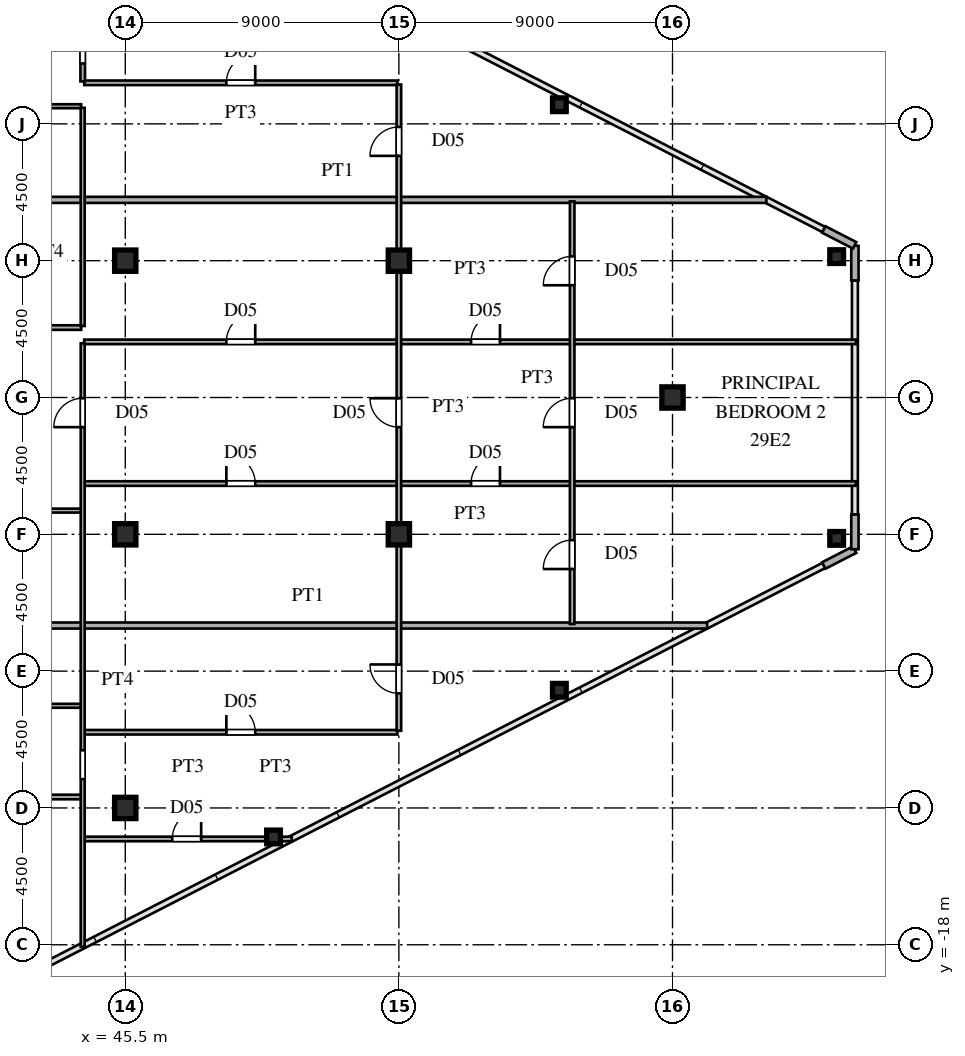
"""IFC4 building model, lengths in metres.
Left out: names, types, materials, properties, quantities, classifications, styles, units other than length and angle.
Written with IfcOpenShell. Run it as: python <this file> out.ifc"""

import sys

from ifc_helpers import new_model, si_unit, direction, frame, frame_2d, origin, origin_2d, place, context, subcontext, project, spatial, rectangle, hollow_rectangle, i_section, extrude, source, transform, mapped, element, fill, save


model = new_model("IFC4")
c1 = context("Model", 3, precision=1e-05, world=origin(), true_north=direction((0.0, 1.0)))
c2 = subcontext(c1, "Body", "Model", "MODEL_VIEW")
j1 = project(units=[si_unit("LENGTHUNIT", "METRE"), si_unit("PLANEANGLEUNIT", "RADIAN")], contexts=[c1])
p1 = place(None, origin())
s1 = spatial("IfcSite", under=j1, at=p1, CompositionType="ELEMENT")
p2 = place(p1, origin())
s2 = spatial("IfcBuilding", under=s1, at=p2, CompositionType="ELEMENT")
p3 = place(p2, frame((0.0, 0.0, 110.4)))
s3 = spatial("IfcBuildingStorey", under=s2, at=p3, CompositionType="ELEMENT", Elevation=110.4)
m1 = source(origin(), c2, "Body", "SweptSolid", [
    extrude(i_section(OverallWidth=0.7, OverallDepth=0.7, WebThickness=0.028, FlangeThickness=0.045, at=origin_2d()), origin(), (0.0, 0.0, 1.0), 3.6),
])
for number, where, z_axis, x_axis in (
    (1, (45.5, -13.5, 0.0), (0.0, 0.0, 1.0), (1.0, 0.0, 0.0)),
    (2, (45.5, -4.5, 0.0), (0.0, 0.0, 1.0), (1.0, 0.0, 0.0)),
    (3, (45.5, 4.5, 0.0), (0.0, 0.0, 1.0), (1.0, 0.0, 0.0)),
    (4, (54.5, -4.5, 0.0), (0.0, 0.0, 1.0), (1.0, 0.0, 0.0)),
    (5, (54.5, 4.5, 0.0), (0.0, 0.0, 1.0), (1.0, 0.0, 0.0)),
    (6, (63.5, 0.0, 0.0), (0.0, 0.0, 1.0), (1.0, 0.0, 0.0)),
):
    element("IfcColumn", number, at=place(p3, frame(where, z_axis=z_axis, x_axis=x_axis)), inside=s3, PredefinedType="COLUMN", context=c2, shape_type="MappedRepresentation", body=[
        mapped(m1, transform((0.0, 0.0, 0.0), scale=1.0)),
    ])
m2 = source(origin(), c2, "Body", "SweptSolid", [
    extrude(hollow_rectangle(XDim=0.45, YDim=0.45, WallThickness=0.018, at=origin_2d()), origin(), (0.0, 0.0, 1.0), 3.6),
])
for number, where, z_axis, x_axis in (
    (7, (68.9, -4.634, 0.0), (0.0, 0.0, 1.0), (1.0, 0.0, 0.0)),
    (8, (68.9, 4.634, 0.0), (0.0, 0.0, 1.0), (1.0, 0.0, 0.0)),
    (9, (50.377, -14.453, 0.0), (0.0, 0.0, 1.0), (1.0, 0.0, 0.0)),
    (10, (59.779, -9.629, 0.0), (0.0, 0.0, 1.0), (1.0, 0.0, 0.0)),
    (11, (59.779, 9.629, 0.0), (0.0, 0.0, 1.0), (1.0, 0.0, 0.0)),
):
    element("IfcColumn", number, at=place(p3, frame(where, z_axis=z_axis, x_axis=x_axis)), inside=s3, PredefinedType="COLUMN", context=c2, shape_type="MappedRepresentation", body=[
        mapped(m2, transform((0.0, 0.0, 0.0), scale=1.0)),
    ])
p4 = place(p3, frame((68.477, -5.525, 0.0), z_axis=(0.0, 0.0, 1.0), x_axis=(0.889797395748, 0.456355776255, 0.0)))
e12 = element("IfcWall", 12, at=p4, inside=s3, PredefinedType="SOLIDWALL", context=c2, shape_type="SweptSolid", body=[
    extrude(rectangle(XDim=1.14, YDim=0.24, at=frame_2d((0.57, 0.0))), origin(), (0.0, 0.0, 1.0), 3.38),
])
for number, where, z_axis, x_axis in (
    (13, (69.5, -4.99, 0.0), (0.0, 0.0, 1.0), (0.0, 1.0, 0.0)),
    (14, (69.5, 3.85, 0.0), (0.0, 0.0, 1.0), (0.0, 1.0, 0.0)),
):
    element("IfcWall", number, at=place(p3, frame(where, z_axis=z_axis, x_axis=x_axis)), inside=s3, PredefinedType="SOLIDWALL", context=c2, shape_type="SweptSolid", body=[
        extrude(rectangle(XDim=1.14, YDim=0.24, at=frame_2d((0.57, 0.0))), origin(), (0.0, 0.0, 1.0), 3.38),
    ])
p5 = place(p3, frame((69.491, 5.005, 0.0), z_axis=(0.0, 0.0, 1.0), x_axis=(-0.889797395748, 0.456355776255, 0.0)))
e15 = element("IfcWall", 15, at=p5, inside=s3, PredefinedType="SOLIDWALL", context=c2, shape_type="SweptSolid", body=[
    extrude(rectangle(XDim=1.14, YDim=0.24, at=frame_2d((0.57, 0.0))), origin(), (0.0, 0.0, 1.0), 3.38),
])
p6 = place(p3, frame((44.15, -14.52, 0.0), z_axis=(0.0, 0.0, 1.0), x_axis=(1.0, 0.0, 0.0)))
e16 = element("IfcWall", 16, at=p6, inside=s3, PredefinedType="PARTITIONING", context=c2, shape_type="SweptSolid", body=[
    extrude(rectangle(XDim=6.828, YDim=0.15, at=frame_2d((3.414, 0.0))), origin(), (0.0, 0.0, 1.0), 2.78),
])
p7 = place(p6, frame((2.896, 0.0, 0.0)))
e17 = element("IfcOpeningElement", 17, at=p7, cuts=e16, PredefinedType="OPENING", context=c2, shape_type="SweptSolid", body=[
    extrude(rectangle(XDim=0.95, YDim=2.15, at=frame_2d((0.475, 1.075))), frame((0.0, 0.085, 0.0), z_axis=(0.0, -1.0, 0.0), x_axis=(1.0, 0.0, 0.0)), (0.0, 0.0, 1.0), 0.17),
])
p8 = place(p3, frame((38.35, -13.14, 0.0), z_axis=(0.0, 0.0, 1.0), x_axis=(1.0, 0.0, 0.0)))
e18 = element("IfcWall", 18, at=p8, inside=s3, PredefinedType="PARTITIONING", context=c2, shape_type="SweptSolid", body=[
    extrude(rectangle(XDim=5.7, YDim=0.15, at=frame_2d((2.85, 0.0))), origin(), (0.0, 0.0, 1.0), 3.38),
])
p9 = place(p8, frame((2.375, 0.0, 0.0)))
e19 = element("IfcOpeningElement", 19, at=p9, cuts=e18, PredefinedType="OPENING", context=c2, shape_type="SweptSolid", body=[
    extrude(rectangle(XDim=0.95, YDim=2.15, at=frame_2d((0.475, 1.075))), frame((0.0, 0.085, 0.0), z_axis=(0.0, -1.0, 0.0), x_axis=(1.0, 0.0, 0.0)), (0.0, 0.0, 1.0), 0.17),
])
p10 = place(p3, frame((44.15, -11.01, 0.0), z_axis=(0.0, 0.0, 1.0), x_axis=(1.0, 0.0, 0.0)))
e20 = element("IfcWall", 20, at=p10, inside=s3, PredefinedType="PARTITIONING", context=c2, shape_type="SweptSolid", body=[
    extrude(rectangle(XDim=10.3, YDim=0.15, at=frame_2d((5.15, 0.0))), origin(), (0.0, 0.0, 1.0), 3.38),
])
p11 = place(p10, frame((4.675, 0.0, 0.0)))
e21 = element("IfcOpeningElement", 21, at=p11, cuts=e20, PredefinedType="OPENING", context=c2, shape_type="SweptSolid", body=[
    extrude(rectangle(XDim=0.95, YDim=2.15, at=frame_2d((0.475, 1.075))), frame((0.0, 0.085, 0.0), z_axis=(0.0, -1.0, 0.0), x_axis=(1.0, 0.0, 0.0)), (0.0, 0.0, 1.0), 0.17),
])
p12 = place(p3, frame((38.35, -10.14, 0.0), z_axis=(0.0, 0.0, 1.0), x_axis=(1.0, 0.0, 0.0)))
e22 = element("IfcWall", 22, at=p12, inside=s3, PredefinedType="PARTITIONING", context=c2, shape_type="SweptSolid", body=[
    extrude(rectangle(XDim=5.7, YDim=0.13, at=frame_2d((2.85, 0.0))), origin(), (0.0, 0.0, 1.0), 3.38),
])
p13 = place(p12, frame((2.41, 0.0, 0.0)))
e23 = element("IfcOpeningElement", 23, at=p13, cuts=e22, PredefinedType="OPENING", context=c2, shape_type="SweptSolid", body=[
    extrude(rectangle(XDim=0.88, YDim=2.1, at=frame_2d((0.44, 1.05))), frame((0.0, 0.075, 0.0), z_axis=(0.0, -1.0, 0.0), x_axis=(1.0, 0.0, 0.0)), (0.0, 0.0, 1.0), 0.15),
])
p14 = place(p3, frame((38.38, -7.5, 0.0), z_axis=(0.0, 0.0, 1.0), x_axis=(1.0, 0.0, 0.0)))
e24 = element("IfcWall", 24, at=p14, inside=s3, PredefinedType="PARTITIONING", context=c2, shape_type="SweptSolid", body=[
    extrude(rectangle(XDim=26.259, YDim=0.2, at=frame_2d((13.129, 0.0))), origin(), (0.0, 0.0, 1.0), 3.38),
])
p15 = place(p3, frame((38.35, -3.72, 0.0), z_axis=(0.0, 0.0, 1.0), x_axis=(1.0, 0.0, 0.0)))
e25 = element("IfcWall", 25, at=p15, inside=s3, PredefinedType="PARTITIONING", context=c2, shape_type="SweptSolid", body=[
    extrude(rectangle(XDim=5.7, YDim=0.13, at=frame_2d((2.85, 0.0))), origin(), (0.0, 0.0, 1.0), 3.38),
])
p16 = place(p15, frame((2.41, 0.0, 0.0)))
e26 = element("IfcOpeningElement", 26, at=p16, cuts=e25, PredefinedType="OPENING", context=c2, shape_type="SweptSolid", body=[
    extrude(rectangle(XDim=0.88, YDim=2.1, at=frame_2d((0.44, 1.05))), frame((0.0, 0.075, 0.0), z_axis=(0.0, -1.0, 0.0), x_axis=(1.0, 0.0, 0.0)), (0.0, 0.0, 1.0), 0.15),
])
p17 = place(p3, frame((44.15, -2.83, 0.0), z_axis=(0.0, 0.0, 1.0), x_axis=(1.0, 0.0, 0.0)))
e27 = element("IfcWall", 27, at=p17, inside=s3, PredefinedType="PARTITIONING", context=c2, shape_type="SweptSolid", body=[
    extrude(rectangle(XDim=25.385, YDim=0.15, at=frame_2d((12.692, 0.0))), origin(), (0.0, 0.0, 1.0), 3.38),
])
p18 = place(p17, frame((4.675, 0.0, 0.0)))
e28 = element("IfcOpeningElement", 28, at=p18, cuts=e27, PredefinedType="OPENING", context=c2, shape_type="SweptSolid", body=[
    extrude(rectangle(XDim=0.95, YDim=2.15, at=frame_2d((0.475, 1.075))), frame((0.0, 0.085, 0.0), z_axis=(0.0, -1.0, 0.0), x_axis=(1.0, 0.0, 0.0)), (0.0, 0.0, 1.0), 0.17),
])
p19 = place(p17, frame((12.725, 0.0, 0.0)))
e29 = element("IfcOpeningElement", 29, at=p19, cuts=e27, PredefinedType="OPENING", context=c2, shape_type="SweptSolid", body=[
    extrude(rectangle(XDim=0.95, YDim=2.15, at=frame_2d((0.475, 1.075))), frame((0.0, 0.085, 0.0), z_axis=(0.0, -1.0, 0.0), x_axis=(1.0, 0.0, 0.0)), (0.0, 0.0, 1.0), 0.17),
])
p20 = place(p3, frame((44.15, 1.83, 0.0), z_axis=(0.0, 0.0, 1.0), x_axis=(1.0, 0.0, 0.0)))
e30 = element("IfcWall", 30, at=p20, inside=s3, PredefinedType="PARTITIONING", context=c2, shape_type="SweptSolid", body=[
    extrude(rectangle(XDim=25.385, YDim=0.15, at=frame_2d((12.692, 0.0))), origin(), (0.0, 0.0, 1.0), 3.38),
])
p21 = place(p20, frame((4.675, 0.0, 0.0)))
e31 = element("IfcOpeningElement", 31, at=p21, cuts=e30, PredefinedType="OPENING", context=c2, shape_type="SweptSolid", body=[
    extrude(rectangle(XDim=0.95, YDim=2.15, at=frame_2d((0.475, 1.075))), frame((0.0, 0.085, 0.0), z_axis=(0.0, -1.0, 0.0), x_axis=(1.0, 0.0, 0.0)), (0.0, 0.0, 1.0), 0.17),
])
p22 = place(p20, frame((12.725, 0.0, 0.0)))
e32 = element("IfcOpeningElement", 32, at=p22, cuts=e30, PredefinedType="OPENING", context=c2, shape_type="SweptSolid", body=[
    extrude(rectangle(XDim=0.95, YDim=2.15, at=frame_2d((0.475, 1.075))), frame((0.0, 0.085, 0.0), z_axis=(0.0, -1.0, 0.0), x_axis=(1.0, 0.0, 0.0)), (0.0, 0.0, 1.0), 0.17),
])
p23 = place(p3, frame((38.35, 2.3, 0.0), z_axis=(0.0, 0.0, 1.0), x_axis=(1.0, 0.0, 0.0)))
e33 = element("IfcWall", 33, at=p23, inside=s3, PredefinedType="PARTITIONING", context=c2, shape_type="SweptSolid", body=[
    extrude(rectangle(XDim=5.7, YDim=0.15, at=frame_2d((2.85, 0.0))), origin(), (0.0, 0.0, 1.0), 3.38),
])
p24 = place(p23, frame((2.375, 0.0, 0.0)))
e34 = element("IfcOpeningElement", 34, at=p24, cuts=e33, PredefinedType="OPENING", context=c2, shape_type="SweptSolid", body=[
    extrude(rectangle(XDim=0.95, YDim=2.15, at=frame_2d((0.475, 1.075))), frame((0.0, 0.085, 0.0), z_axis=(0.0, -1.0, 0.0), x_axis=(1.0, 0.0, 0.0)), (0.0, 0.0, 1.0), 0.17),
])
p25 = place(p3, frame((38.38, 6.5, 0.0), z_axis=(0.0, 0.0, 1.0), x_axis=(1.0, 0.0, 0.0)))
e35 = element("IfcWall", 35, at=p25, inside=s3, PredefinedType="PARTITIONING", context=c2, shape_type="SweptSolid", body=[
    extrude(rectangle(XDim=28.208, YDim=0.2, at=frame_2d((14.104, 0.0))), origin(), (0.0, 0.0, 1.0), 3.38),
])
p26 = place(p3, frame((38.35, 9.58, 0.0), z_axis=(0.0, 0.0, 1.0), x_axis=(1.0, 0.0, 0.0)))
e36 = element("IfcWall", 36, at=p26, inside=s3, PredefinedType="PARTITIONING", context=c2, shape_type="SweptSolid", body=[
    extrude(rectangle(XDim=5.7, YDim=0.13, at=frame_2d((2.85, 0.0))), origin(), (0.0, 0.0, 1.0), 3.38),
])
p27 = place(p26, frame((2.41, 0.0, 0.0)))
e37 = element("IfcOpeningElement", 37, at=p27, cuts=e36, PredefinedType="OPENING", context=c2, shape_type="SweptSolid", body=[
    extrude(rectangle(XDim=0.88, YDim=2.1, at=frame_2d((0.44, 1.05))), frame((0.0, 0.075, 0.0), z_axis=(0.0, -1.0, 0.0), x_axis=(1.0, 0.0, 0.0)), (0.0, 0.0, 1.0), 0.15),
])
p28 = place(p3, frame((44.15, 10.35, 0.0), z_axis=(0.0, 0.0, 1.0), x_axis=(1.0, 0.0, 0.0)))
e38 = element("IfcWall", 38, at=p28, inside=s3, PredefinedType="PARTITIONING", context=c2, shape_type="SweptSolid", body=[
    extrude(rectangle(XDim=10.3, YDim=0.15, at=frame_2d((5.15, 0.0))), origin(), (0.0, 0.0, 1.0), 3.38),
])
p29 = place(p28, frame((4.675, 0.0, 0.0)))
e39 = element("IfcOpeningElement", 39, at=p29, cuts=e38, PredefinedType="OPENING", context=c2, shape_type="SweptSolid", body=[
    extrude(rectangle(XDim=0.95, YDim=2.15, at=frame_2d((0.475, 1.075))), frame((0.0, 0.085, 0.0), z_axis=(0.0, -1.0, 0.0), x_axis=(1.0, 0.0, 0.0)), (0.0, 0.0, 1.0), 0.17),
])
p30 = place(p3, frame((44.1, -18.069, 0.0), z_axis=(0.0, 0.0, 1.0), x_axis=(0.0, 1.0, 0.0)))
e40 = element("IfcWall", 40, at=p30, inside=s3, PredefinedType="PARTITIONING", context=c2, shape_type="SweptSolid", body=[
    extrude(rectangle(XDim=19.852, YDim=0.13, at=frame_2d((9.926, 0.0))), origin(), (0.0, 0.0, 1.0), 3.38),
])
p31 = place(p30, frame((5.516, 0.0, 0.0)))
e41 = element("IfcOpeningElement", 41, at=p31, cuts=e40, PredefinedType="OPENING", context=c2, shape_type="SweptSolid", body=[
    extrude(rectangle(XDim=0.95, YDim=2.15, at=frame_2d((0.475, 1.075))), frame((0.0, 0.075, 0.0), z_axis=(0.0, -1.0, 0.0), x_axis=(1.0, 0.0, 0.0)), (0.0, 0.0, 1.0), 0.15),
])
p32 = place(p30, frame((17.094, 0.0, 0.0)))
e42 = element("IfcOpeningElement", 42, at=p32, cuts=e40, PredefinedType="OPENING", context=c2, shape_type="SweptSolid", body=[
    extrude(rectangle(XDim=0.95, YDim=2.15, at=frame_2d((0.475, 1.075))), frame((0.0, 0.075, 0.0), z_axis=(0.0, -1.0, 0.0), x_axis=(1.0, 0.0, 0.0)), (0.0, 0.0, 1.0), 0.15),
])
p33 = place(p3, frame((44.1, 2.352, 0.0), z_axis=(0.0, 0.0, 1.0), x_axis=(0.0, 1.0, 0.0)))
e43 = element("IfcWall", 43, at=p33, inside=s3, PredefinedType="PARTITIONING", context=c2, shape_type="SweptSolid", body=[
    extrude(rectangle(XDim=7.176, YDim=0.13, at=frame_2d((3.588, 0.0))), origin(), (0.0, 0.0, 1.0), 3.38),
])
p34 = place(p3, frame((44.1, 10.395, 0.0), z_axis=(0.0, 0.0, 1.0), x_axis=(0.0, 1.0, 0.0)))
e44 = element("IfcWall", 44, at=p34, inside=s3, PredefinedType="PARTITIONING", context=c2, shape_type="SweptSolid", body=[
    extrude(rectangle(XDim=7.674, YDim=0.15, at=frame_2d((3.837, 0.0))), origin(), (0.0, 0.0, 1.0), 3.38),
])
p35 = place(p34, frame((0.591, 0.0, 0.0)))
e45 = element("IfcOpeningElement", 45, at=p35, cuts=e44, PredefinedType="OPENING", context=c2, shape_type="SweptSolid", body=[
    extrude(rectangle(XDim=0.95, YDim=2.15, at=frame_2d((0.475, 1.075))), frame((0.0, 0.085, 0.0), z_axis=(0.0, -1.0, 0.0), x_axis=(1.0, 0.0, 0.0)), (0.0, 0.0, 1.0), 0.17),
])
p36 = place(p3, frame((54.5, -10.961, 0.0), z_axis=(0.0, 0.0, 1.0), x_axis=(0.0, 1.0, 0.0)))
e46 = element("IfcWall", 46, at=p36, inside=s3, PredefinedType="PARTITIONING", context=c2, shape_type="SweptSolid", body=[
    extrude(rectangle(XDim=21.256, YDim=0.15, at=frame_2d((10.628, 0.0))), origin(), (0.0, 0.0, 1.0), 2.78),
])
p37 = place(p36, frame((1.23, 0.0, 0.0)))
e47 = element("IfcOpeningElement", 47, at=p37, cuts=e46, PredefinedType="OPENING", context=c2, shape_type="SweptSolid", body=[
    extrude(rectangle(XDim=0.95, YDim=2.15, at=frame_2d((0.475, 1.075))), frame((0.0, 0.085, 0.0), z_axis=(0.0, -1.0, 0.0), x_axis=(1.0, 0.0, 0.0)), (0.0, 0.0, 1.0), 0.17),
])
p38 = place(p36, frame((9.986, 0.0, 0.0)))
e48 = element("IfcOpeningElement", 48, at=p38, cuts=e46, PredefinedType="OPENING", context=c2, shape_type="SweptSolid", body=[
    extrude(rectangle(XDim=0.95, YDim=2.15, at=frame_2d((0.475, 1.075))), frame((0.0, 0.085, 0.0), z_axis=(0.0, -1.0, 0.0), x_axis=(1.0, 0.0, 0.0)), (0.0, 0.0, 1.0), 0.17),
])
p39 = place(p36, frame((18.908, 0.0, 0.0)))
e49 = element("IfcOpeningElement", 49, at=p39, cuts=e46, PredefinedType="OPENING", context=c2, shape_type="SweptSolid", body=[
    extrude(rectangle(XDim=0.95, YDim=2.15, at=frame_2d((0.475, 1.075))), frame((0.0, 0.085, 0.0), z_axis=(0.0, -1.0, 0.0), x_axis=(1.0, 0.0, 0.0)), (0.0, 0.0, 1.0), 0.17),
])
p40 = place(p3, frame((60.2, -7.45, 0.0), z_axis=(0.0, 0.0, 1.0), x_axis=(0.0, 1.0, 0.0)))
e50 = element("IfcWall", 50, at=p40, inside=s3, PredefinedType="PARTITIONING", context=c2, shape_type="SweptSolid", body=[
    extrude(rectangle(XDim=13.9, YDim=0.15, at=frame_2d((6.95, 0.0))), origin(), (0.0, 0.0, 1.0), 3.38),
])
p41 = place(p40, frame((1.808, 0.0, 0.0)))
e51 = element("IfcOpeningElement", 51, at=p41, cuts=e50, PredefinedType="OPENING", context=c2, shape_type="SweptSolid", body=[
    extrude(rectangle(XDim=0.95, YDim=2.15, at=frame_2d((0.475, 1.075))), frame((0.0, 0.085, 0.0), z_axis=(0.0, -1.0, 0.0), x_axis=(1.0, 0.0, 0.0)), (0.0, 0.0, 1.0), 0.17),
])
p42 = place(p40, frame((6.475, 0.0, 0.0)))
e52 = element("IfcOpeningElement", 52, at=p42, cuts=e50, PredefinedType="OPENING", context=c2, shape_type="SweptSolid", body=[
    extrude(rectangle(XDim=0.95, YDim=2.15, at=frame_2d((0.475, 1.075))), frame((0.0, 0.085, 0.0), z_axis=(0.0, -1.0, 0.0), x_axis=(1.0, 0.0, 0.0)), (0.0, 0.0, 1.0), 0.17),
])
p43 = place(p40, frame((11.142, 0.0, 0.0)))
e53 = element("IfcOpeningElement", 53, at=p43, cuts=e50, PredefinedType="OPENING", context=c2, shape_type="SweptSolid", body=[
    extrude(rectangle(XDim=0.95, YDim=2.15, at=frame_2d((0.475, 1.075))), frame((0.0, 0.085, 0.0), z_axis=(0.0, -1.0, 0.0), x_axis=(1.0, 0.0, 0.0)), (0.0, 0.0, 1.0), 0.17),
])
m3 = source(origin(), c2, "Body", "SweptSolid", [
    extrude(rectangle(XDim=0.95, YDim=2.15, at=frame_2d((0.475, 1.075))), frame((0.0, 0.025, 0.0), z_axis=(0.0, -1.0, 0.0), x_axis=(1.0, 0.0, 0.0)), (0.0, 0.0, 1.0), 0.05),
])
p44 = place(p7, origin())
e54 = element("IfcDoor", 54, at=p44, inside=s3, OperationType="SINGLE_SWING_RIGHT", PredefinedType="DOOR", context=c2, shape_type="MappedRepresentation", body=[
    mapped(m3, transform((0.0, 0.0, 0.0), scale=1.0)),
])
fill(e17, e54)
p45 = place(p11, origin())
e55 = element("IfcDoor", 55, at=p45, inside=s3, OperationType="SINGLE_SWING_LEFT", PredefinedType="DOOR", context=c2, shape_type="MappedRepresentation", body=[
    mapped(m3, transform((0.0, 0.0, 0.0), scale=1.0)),
])
fill(e21, e55)
p46 = place(p18, origin())
e56 = element("IfcDoor", 56, at=p46, inside=s3, OperationType="SINGLE_SWING_LEFT", PredefinedType="DOOR", context=c2, shape_type="MappedRepresentation", body=[
    mapped(m3, transform((0.0, 0.0, 0.0), scale=1.0)),
])
fill(e28, e56)
p47 = place(p19, origin())
e57 = element("IfcDoor", 57, at=p47, inside=s3, OperationType="SINGLE_SWING_RIGHT", PredefinedType="DOOR", context=c2, shape_type="MappedRepresentation", body=[
    mapped(m3, transform((0.0, 0.0, 0.0), scale=1.0)),
])
fill(e29, e57)
p48 = place(p21, origin())
e58 = element("IfcDoor", 58, at=p48, inside=s3, OperationType="SINGLE_SWING_RIGHT", PredefinedType="DOOR", context=c2, shape_type="MappedRepresentation", body=[
    mapped(m3, transform((0.0, 0.0, 0.0), scale=1.0)),
])
fill(e31, e58)
p49 = place(p22, origin())
e59 = element("IfcDoor", 59, at=p49, inside=s3, OperationType="SINGLE_SWING_RIGHT", PredefinedType="DOOR", context=c2, shape_type="MappedRepresentation", body=[
    mapped(m3, transform((0.0, 0.0, 0.0), scale=1.0)),
])
fill(e32, e59)
p50 = place(p29, origin())
e60 = element("IfcDoor", 60, at=p50, inside=s3, OperationType="SINGLE_SWING_RIGHT", PredefinedType="DOOR", context=c2, shape_type="MappedRepresentation", body=[
    mapped(m3, transform((0.0, 0.0, 0.0), scale=1.0)),
])
fill(e39, e60)
p51 = place(p32, origin())
e61 = element("IfcDoor", 61, at=p51, inside=s3, OperationType="SINGLE_SWING_LEFT", PredefinedType="DOOR", context=c2, shape_type="MappedRepresentation", body=[
    mapped(m3, transform((0.0, 0.0, 0.0), scale=1.0)),
])
fill(e42, e61)
p52 = place(p37, origin())
e62 = element("IfcDoor", 62, at=p52, inside=s3, OperationType="SINGLE_SWING_RIGHT", PredefinedType="DOOR", context=c2, shape_type="MappedRepresentation", body=[
    mapped(m3, transform((0.0, 0.0, 0.0), scale=1.0)),
])
fill(e47, e62)
p53 = place(p38, origin())
e63 = element("IfcDoor", 63, at=p53, inside=s3, OperationType="SINGLE_SWING_RIGHT", PredefinedType="DOOR", context=c2, shape_type="MappedRepresentation", body=[
    mapped(m3, transform((0.0, 0.0, 0.0), scale=1.0)),
])
fill(e48, e63)
p54 = place(p39, origin())
e64 = element("IfcDoor", 64, at=p54, inside=s3, OperationType="SINGLE_SWING_LEFT", PredefinedType="DOOR", context=c2, shape_type="MappedRepresentation", body=[
    mapped(m3, transform((0.0, 0.0, 0.0), scale=1.0)),
])
fill(e49, e64)
p55 = place(p41, origin())
e65 = element("IfcDoor", 65, at=p55, inside=s3, OperationType="SINGLE_SWING_LEFT", PredefinedType="DOOR", context=c2, shape_type="MappedRepresentation", body=[
    mapped(m3, transform((0.0, 0.0, 0.0), scale=1.0)),
])
fill(e51, e65)
p56 = place(p42, origin())
e66 = element("IfcDoor", 66, at=p56, inside=s3, OperationType="SINGLE_SWING_LEFT", PredefinedType="DOOR", context=c2, shape_type="MappedRepresentation", body=[
    mapped(m3, transform((0.0, 0.0, 0.0), scale=1.0)),
])
fill(e52, e66)
p57 = place(p43, origin())
e67 = element("IfcDoor", 67, at=p57, inside=s3, OperationType="SINGLE_SWING_LEFT", PredefinedType="DOOR", context=c2, shape_type="MappedRepresentation", body=[
    mapped(m3, transform((0.0, 0.0, 0.0), scale=1.0)),
])
fill(e53, e67)
save(model, sys.argv[1])
